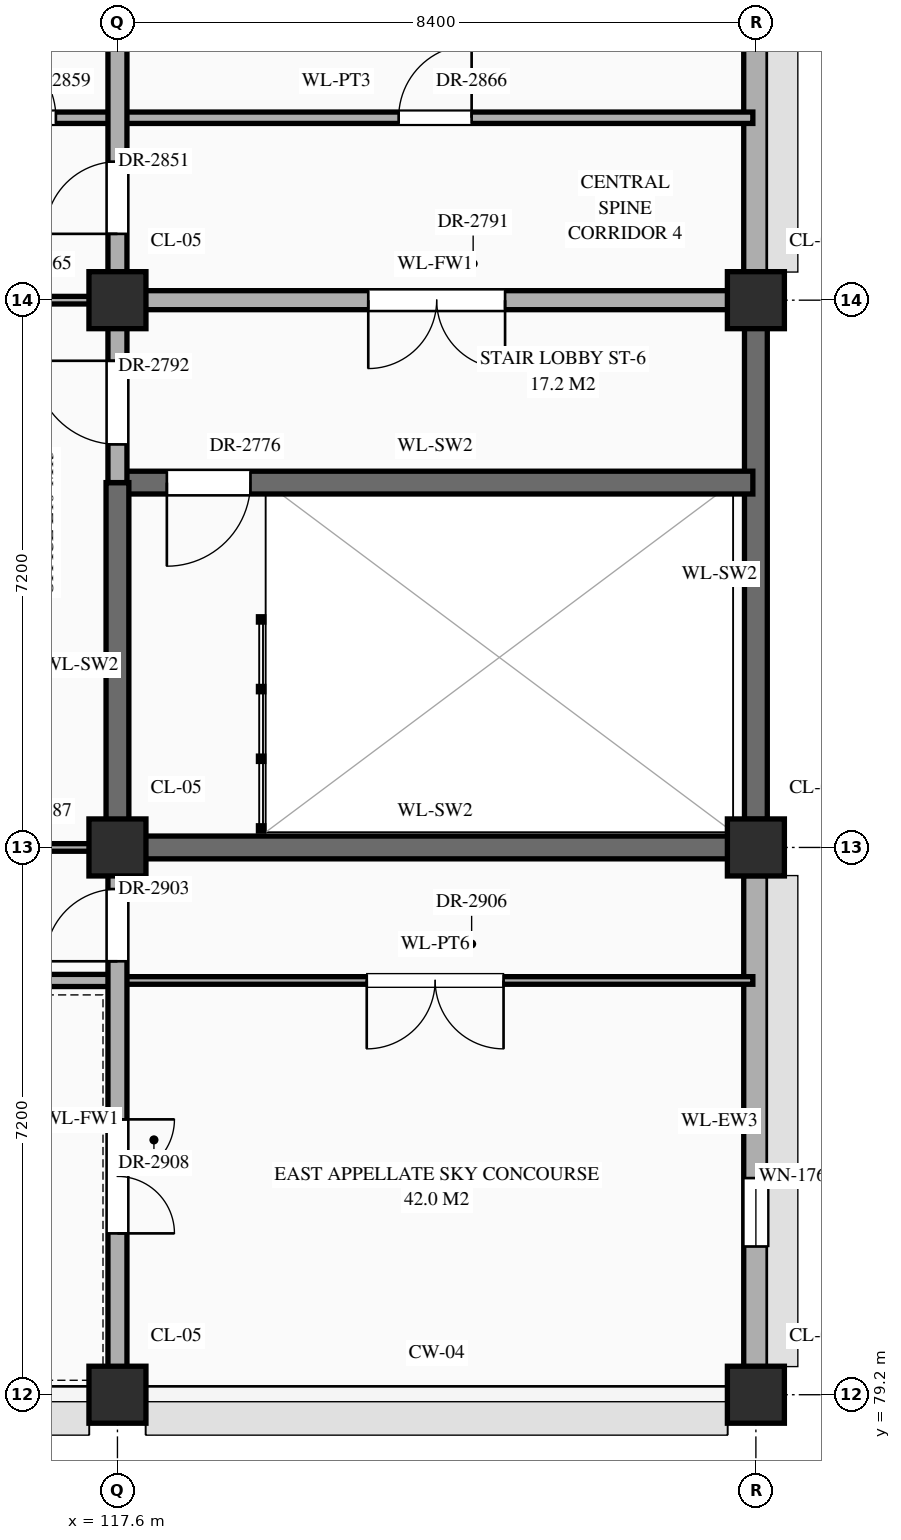
"""IFC4 building model, lengths in metres.
Left out: names, types, materials, properties, quantities, classifications, styles, units other than length and angle.
Written with IfcOpenShell. Run it as: python <this file> out.ifc"""

import sys

from ifc_helpers import new_model, si_unit, direction, frame, frame_2d, origin, origin_2d, place, context, subcontext, project, spatial, rectangle, extrude, element, fill, save


model = new_model("IFC4")
c1 = context("Model", 3, precision=1e-05, world=origin(), true_north=direction((0.0, 1.0)))
c2 = subcontext(c1, "Body", "Model", "MODEL_VIEW")
j1 = project(units=[si_unit("LENGTHUNIT", "METRE"), si_unit("PLANEANGLEUNIT", "RADIAN")], contexts=[c1])
p1 = place(None, origin())
s1 = spatial("IfcSite", under=j1, at=p1, CompositionType="ELEMENT")
p2 = place(p1, origin())
s2 = spatial("IfcBuilding", under=s1, at=p2, CompositionType="ELEMENT")
p3 = place(p2, frame((0.0, 0.0, 43.5)))
s3 = spatial("IfcBuildingStorey", under=s2, at=p3, CompositionType="ELEMENT", Elevation=43.5)
for number, where, z_axis, x_axis in (
    (1, (117.6, 79.2, 0.0), (0.0, 0.0, 1.0), (1.0, 0.0, 0.0)),
    (2, (117.6, 86.4, 0.0), (0.0, 0.0, 1.0), (1.0, 0.0, 0.0)),
    (3, (117.6, 93.6, 0.0), (0.0, 0.0, 1.0), (1.0, 0.0, 0.0)),
    (4, (126.0, 79.2, 0.0), (0.0, 0.0, 1.0), (1.0, 0.0, 0.0)),
    (5, (126.0, 86.4, 0.0), (0.0, 0.0, 1.0), (1.0, 0.0, 0.0)),
    (6, (126.0, 93.6, 0.0), (0.0, 0.0, 1.0), (1.0, 0.0, 0.0)),
):
    element("IfcColumn", number, at=place(p3, frame(where, z_axis=z_axis, x_axis=x_axis)), inside=s3, PredefinedType="COLUMN", context=c2, shape_type="SweptSolid", body=[
        extrude(rectangle(XDim=0.75, YDim=0.75, at=origin_2d()), origin(), (0.0, 0.0, 1.0), 4.2),
    ])
p4 = place(p3, frame((126.0, 79.57, 0.0), z_axis=(0.0, 0.0, 1.0), x_axis=(0.0, 1.0, 0.0)))
e7 = element("IfcWall", 7, at=p4, inside=s3, PredefinedType="STANDARD", context=c2, shape_type="SweptSolid", body=[
    extrude(rectangle(XDim=6.46, YDim=0.32, at=frame_2d((3.23, 0.0))), origin(), (0.0, 0.0, 1.0), 3.35),
])
p5 = place(p4, frame((1.58, 0.0, 0.85)))
e8 = element("IfcOpeningElement", 8, at=p5, cuts=e7, PredefinedType="OPENING", context=c2, shape_type="SweptSolid", body=[
    extrude(rectangle(XDim=0.9, YDim=1.92, at=frame_2d((0.45, 0.96))), frame((0.0, 0.172, 0.0), z_axis=(0.0, -1.0, 0.0), x_axis=(1.0, 0.0, 0.0)), (0.0, 0.0, 1.0), 0.344),
])
p6 = place(p3, frame((126.0, 86.77, 0.0), z_axis=(0.0, 0.0, 1.0), x_axis=(0.0, 1.0, 0.0)))
e9 = element("IfcWall", 9, at=p6, inside=s3, PredefinedType="SHEAR", context=c2, shape_type="SweptSolid", body=[
    extrude(rectangle(XDim=6.46, YDim=0.3, at=frame_2d((3.23, 0.0))), origin(), (0.0, 0.0, 1.0), 4.0),
])
p7 = place(p3, frame((126.0, 93.97, 0.0), z_axis=(0.0, 0.0, 1.0), x_axis=(0.0, 1.0, 0.0)))
e10 = element("IfcWall", 10, at=p7, inside=s3, PredefinedType="STANDARD", context=c2, shape_type="SweptSolid", body=[
    extrude(rectangle(XDim=6.46, YDim=0.32, at=frame_2d((3.23, 0.0))), origin(), (0.0, 0.0, 1.0), 3.35),
])
p8 = place(p7, frame((3.855, 0.0, 0.85)))
e11 = element("IfcOpeningElement", 11, at=p8, cuts=e10, PredefinedType="OPENING", context=c2, shape_type="SweptSolid", body=[
    extrude(rectangle(XDim=1.35, YDim=1.2, at=frame_2d((0.675, 0.6))), frame((0.0, 0.172, 0.0), z_axis=(0.0, -1.0, 0.0), x_axis=(1.0, 0.0, 0.0)), (0.0, 0.0, 1.0), 0.344),
])
p9 = place(p3, frame((100.8, 84.65, 0.0), z_axis=(0.0, 0.0, 1.0), x_axis=(1.0, 0.0, 0.0)))
e12 = element("IfcWall", 12, at=p9, inside=s3, PredefinedType="STANDARD", context=c2, shape_type="SweptSolid", body=[
    extrude(rectangle(XDim=16.8, YDim=0.16, at=frame_2d((8.4, 0.0))), origin(), (0.0, 0.0, 1.0), 3.95),
])
p10 = place(p9, frame((7.45, 0.0, 0.0)))
e13 = element("IfcOpeningElement", 13, at=p10, cuts=e12, PredefinedType="OPENING", context=c2, shape_type="SweptSolid", body=[
    extrude(rectangle(XDim=1.9, YDim=2.5, at=frame_2d((0.95, 1.25))), frame((0.0, 0.092, 0.0), z_axis=(0.0, -1.0, 0.0), x_axis=(1.0, 0.0, 0.0)), (0.0, 0.0, 1.0), 0.184),
])
p11 = place(p3, frame((117.6, 84.65, 0.0), z_axis=(0.0, 0.0, 1.0), x_axis=(1.0, 0.0, 0.0)))
e14 = element("IfcWall", 14, at=p11, inside=s3, PredefinedType="STANDARD", context=c2, shape_type="SweptSolid", body=[
    extrude(rectangle(XDim=8.36, YDim=0.1, at=frame_2d((4.18, 0.0))), origin(), (0.0, 0.0, 1.0), 4.0),
])
p12 = place(p11, frame((3.28, 0.0, 0.0)))
e15 = element("IfcOpeningElement", 15, at=p12, cuts=e14, PredefinedType="OPENING", context=c2, shape_type="SweptSolid", body=[
    extrude(rectangle(XDim=1.8, YDim=2.5, at=frame_2d((0.9, 1.25))), frame((0.0, 0.062, 0.0), z_axis=(0.0, -1.0, 0.0), x_axis=(1.0, 0.0, 0.0)), (0.0, 0.0, 1.0), 0.124),
])
p13 = place(p3, frame((109.2, 86.4, 0.0), z_axis=(0.0, 0.0, 1.0), x_axis=(1.0, 0.0, 0.0)))
e16 = element("IfcWall", 16, at=p13, inside=s3, PredefinedType="STANDARD", context=c2, shape_type="SweptSolid", body=[
    extrude(rectangle(XDim=8.4, YDim=0.1, at=frame_2d((4.2, 0.0))), origin(), (0.0, 0.0, 1.0), 3.1),
])
p14 = place(p13, frame((1.048, 0.0, 0.0)))
e17 = element("IfcOpeningElement", 17, at=p14, cuts=e16, PredefinedType="OPENING", context=c2, shape_type="SweptSolid", body=[
    extrude(rectangle(XDim=1.0, YDim=2.25, at=frame_2d((0.5, 1.125))), frame((0.0, 0.062, 0.0), z_axis=(0.0, -1.0, 0.0), x_axis=(1.0, 0.0, 0.0)), (0.0, 0.0, 1.0), 0.124),
])
p15 = place(p13, frame((3.66, 0.0, 0.0)))
e18 = element("IfcOpeningElement", 18, at=p15, cuts=e16, PredefinedType="OPENING", context=c2, shape_type="SweptSolid", body=[
    extrude(rectangle(XDim=1.08, YDim=2.25, at=frame_2d((0.54, 1.125))), frame((0.0, 0.062, 0.0), z_axis=(0.0, -1.0, 0.0), x_axis=(1.0, 0.0, 0.0)), (0.0, 0.0, 1.0), 0.124),
])
p16 = place(p13, frame((6.292, 0.0, 0.0)))
e19 = element("IfcOpeningElement", 19, at=p16, cuts=e16, PredefinedType="OPENING", context=c2, shape_type="SweptSolid", body=[
    extrude(rectangle(XDim=1.12, YDim=2.25, at=frame_2d((0.56, 1.125))), frame((0.0, 0.062, 0.0), z_axis=(0.0, -1.0, 0.0), x_axis=(1.0, 0.0, 0.0)), (0.0, 0.0, 1.0), 0.124),
])
p17 = place(p3, frame((117.6, 86.4, 0.0), z_axis=(0.0, 0.0, 1.0), x_axis=(1.0, 0.0, 0.0)))
e20 = element("IfcWall", 20, at=p17, inside=s3, PredefinedType="SHEAR", context=c2, shape_type="SweptSolid", body=[
    extrude(rectangle(XDim=8.36, YDim=0.3, at=frame_2d((4.18, 0.0))), origin(), (0.0, 0.0, 1.0), 4.0),
])
p18 = place(p3, frame((117.6, 91.2, 0.0), z_axis=(0.0, 0.0, 1.0), x_axis=(1.0, 0.0, 0.0)))
e21 = element("IfcWall", 21, at=p18, inside=s3, PredefinedType="SHEAR", context=c2, shape_type="SweptSolid", body=[
    extrude(rectangle(XDim=8.36, YDim=0.3, at=frame_2d((4.18, 0.0))), origin(), (0.0, 0.0, 1.0), 4.0),
])
p19 = place(p18, frame((0.65, 0.0, 0.0)))
e22 = element("IfcOpeningElement", 22, at=p19, cuts=e21, PredefinedType="OPENING", context=c2, shape_type="SweptSolid", body=[
    extrude(rectangle(XDim=1.1, YDim=2.2, at=frame_2d((0.55, 1.1))), frame((0.0, 0.162, 0.0), z_axis=(0.0, -1.0, 0.0), x_axis=(1.0, 0.0, 0.0)), (0.0, 0.0, 1.0), 0.324),
])
p20 = place(p3, frame((109.2, 93.6, 0.0), z_axis=(0.0, 0.0, 1.0), x_axis=(1.0, 0.0, 0.0)))
e23 = element("IfcWall", 23, at=p20, inside=s3, PredefinedType="STANDARD", context=c2, shape_type="SweptSolid", body=[
    extrude(rectangle(XDim=8.4, YDim=0.1, at=frame_2d((4.2, 0.0))), origin(), (0.0, 0.0, 1.0), 3.1),
])
p21 = place(p20, frame((1.097, 0.0, 0.0)))
e24 = element("IfcOpeningElement", 24, at=p21, cuts=e23, PredefinedType="OPENING", context=c2, shape_type="SweptSolid", body=[
    extrude(rectangle(XDim=0.9, YDim=2.15, at=frame_2d((0.45, 1.075))), frame((0.0, 0.062, 0.0), z_axis=(0.0, -1.0, 0.0), x_axis=(1.0, 0.0, 0.0)), (0.0, 0.0, 1.0), 0.124),
])
p22 = place(p20, frame((3.77, 0.0, 0.0)))
e25 = element("IfcOpeningElement", 25, at=p22, cuts=e23, PredefinedType="OPENING", context=c2, shape_type="SweptSolid", body=[
    extrude(rectangle(XDim=0.86, YDim=2.1, at=frame_2d((0.43, 1.05))), frame((0.0, 0.062, 0.0), z_axis=(0.0, -1.0, 0.0), x_axis=(1.0, 0.0, 0.0)), (0.0, 0.0, 1.0), 0.124),
])
p23 = place(p20, frame((6.393, 0.0, 0.0)))
e26 = element("IfcOpeningElement", 26, at=p23, cuts=e23, PredefinedType="OPENING", context=c2, shape_type="SweptSolid", body=[
    extrude(rectangle(XDim=0.92, YDim=2.15, at=frame_2d((0.46, 1.075))), frame((0.0, 0.062, 0.0), z_axis=(0.0, -1.0, 0.0), x_axis=(1.0, 0.0, 0.0)), (0.0, 0.0, 1.0), 0.124),
])
p24 = place(p3, frame((117.6, 93.6, 0.0), z_axis=(0.0, 0.0, 1.0), x_axis=(1.0, 0.0, 0.0)))
e27 = element("IfcWall", 27, at=p24, inside=s3, PredefinedType="STANDARD", context=c2, shape_type="SweptSolid", body=[
    extrude(rectangle(XDim=8.36, YDim=0.25, at=frame_2d((4.18, 0.0))), origin(), (0.0, 0.0, 1.0), 3.15),
])
p25 = place(p24, frame((3.3, 0.0, 0.0)))
e28 = element("IfcOpeningElement", 28, at=p25, cuts=e27, PredefinedType="OPENING", context=c2, shape_type="SweptSolid", body=[
    extrude(rectangle(XDim=1.8, YDim=2.35, at=frame_2d((0.9, 1.175))), frame((0.0, 0.137, 0.0), z_axis=(0.0, -1.0, 0.0), x_axis=(1.0, 0.0, 0.0)), (0.0, 0.0, 1.0), 0.274),
])
p26 = place(p3, frame((115.0, 96.0, 0.0), z_axis=(0.0, 0.0, 1.0), x_axis=(1.0, 0.0, 0.0)))
e29 = element("IfcWall", 29, at=p26, inside=s3, PredefinedType="STANDARD", context=c2, shape_type="SweptSolid", body=[
    extrude(rectangle(XDim=10.96, YDim=0.15, at=frame_2d((5.48, 0.0))), origin(), (0.0, 0.0, 1.0), 4.0),
])
p27 = place(p26, frame((0.81, 0.0, 0.0)))
e30 = element("IfcOpeningElement", 30, at=p27, cuts=e29, PredefinedType="OPENING", context=c2, shape_type="SweptSolid", body=[
    extrude(rectangle(XDim=0.98, YDim=2.35, at=frame_2d((0.49, 1.175))), frame((0.0, 0.087, 0.0), z_axis=(0.0, -1.0, 0.0), x_axis=(1.0, 0.0, 0.0)), (0.0, 0.0, 1.0), 0.174),
])
p28 = place(p26, frame((6.3, 0.0, 0.0)))
e31 = element("IfcOpeningElement", 31, at=p28, cuts=e29, PredefinedType="OPENING", context=c2, shape_type="SweptSolid", body=[
    extrude(rectangle(XDim=0.96, YDim=2.2, at=frame_2d((0.48, 1.1))), frame((0.0, 0.087, 0.0), z_axis=(0.0, -1.0, 0.0), x_axis=(1.0, 0.0, 0.0)), (0.0, 0.0, 1.0), 0.174),
])
p29 = place(p3, frame((117.6, 79.24, 0.0), z_axis=(0.0, 0.0, 1.0), x_axis=(0.0, 1.0, 0.0)))
e32 = element("IfcWall", 32, at=p29, inside=s3, PredefinedType="STANDARD", context=c2, shape_type="SweptSolid", body=[
    extrude(rectangle(XDim=7.16, YDim=0.25, at=frame_2d((3.58, 0.0))), origin(), (0.0, 0.0, 1.0), 3.2),
])
p30 = place(p29, frame((5.663, 0.0, 0.0)))
e33 = element("IfcOpeningElement", 33, at=p30, cuts=e32, PredefinedType="OPENING", context=c2, shape_type="SweptSolid", body=[
    extrude(rectangle(XDim=0.95, YDim=2.15, at=frame_2d((0.475, 1.075))), frame((0.0, 0.137, 0.0), z_axis=(0.0, -1.0, 0.0), x_axis=(1.0, 0.0, 0.0)), (0.0, 0.0, 1.0), 0.274),
])
p31 = place(p29, frame((2.083, 0.0, 0.0)))
e34 = element("IfcOpeningElement", 34, at=p31, cuts=e32, PredefinedType="OPENING", context=c2, shape_type="SweptSolid", body=[
    extrude(rectangle(XDim=1.5, YDim=2.25, at=frame_2d((0.75, 1.125))), frame((0.0, 0.137, 0.0), z_axis=(0.0, -1.0, 0.0), x_axis=(1.0, 0.0, 0.0)), (0.0, 0.0, 1.0), 0.274),
])
p32 = place(p3, frame((117.6, 86.4, 0.0), z_axis=(0.0, 0.0, 1.0), x_axis=(0.0, 1.0, 0.0)))
e35 = element("IfcWall", 35, at=p32, inside=s3, PredefinedType="SHEAR", context=c2, shape_type="SweptSolid", body=[
    extrude(rectangle(XDim=4.8, YDim=0.3, at=frame_2d((2.4, 0.0))), origin(), (0.0, 0.0, 1.0), 3.95),
])
p33 = place(p3, frame((117.6, 91.2, 0.0), z_axis=(0.0, 0.0, 1.0), x_axis=(0.0, 1.0, 0.0)))
e36 = element("IfcWall", 36, at=p33, inside=s3, PredefinedType="STANDARD", context=c2, shape_type="SweptSolid", body=[
    extrude(rectangle(XDim=13.2, YDim=0.25, at=frame_2d((6.6, 0.0))), origin(), (0.0, 0.0, 1.0), 3.2),
])
p34 = place(p33, frame((0.502, 0.0, 0.0)))
e37 = element("IfcOpeningElement", 37, at=p34, cuts=e36, PredefinedType="OPENING", context=c2, shape_type="SweptSolid", body=[
    extrude(rectangle(XDim=1.1, YDim=2.2, at=frame_2d((0.55, 1.1))), frame((0.0, 0.137, 0.0), z_axis=(0.0, -1.0, 0.0), x_axis=(1.0, 0.0, 0.0)), (0.0, 0.0, 1.0), 0.274),
])
p35 = place(p33, frame((10.472, 0.0, 0.0)))
e38 = element("IfcOpeningElement", 38, at=p35, cuts=e36, PredefinedType="OPENING", context=c2, shape_type="SweptSolid", body=[
    extrude(rectangle(XDim=0.95, YDim=2.15, at=frame_2d((0.475, 1.075))), frame((0.0, 0.137, 0.0), z_axis=(0.0, -1.0, 0.0), x_axis=(1.0, 0.0, 0.0)), (0.0, 0.0, 1.0), 0.274),
])
p36 = place(p33, frame((3.272, 0.0, 0.0)))
e39 = element("IfcOpeningElement", 39, at=p36, cuts=e36, PredefinedType="OPENING", context=c2, shape_type="SweptSolid", body=[
    extrude(rectangle(XDim=0.95, YDim=2.15, at=frame_2d((0.475, 1.075))), frame((0.0, 0.137, 0.0), z_axis=(0.0, -1.0, 0.0), x_axis=(1.0, 0.0, 0.0)), (0.0, 0.0, 1.0), 0.274),
])
p37 = place(p5, origin())
e40 = element("IfcWindow", 40, at=p37, inside=s3, PartitioningType="SINGLE_PANEL", PredefinedType="WINDOW", context=c2, shape_type="SweptSolid", body=[
    extrude(rectangle(XDim=0.9, YDim=1.92, at=frame_2d((0.45, 0.96))), frame((0.0, 0.03, 0.0), z_axis=(0.0, -1.0, 0.0), x_axis=(1.0, 0.0, 0.0)), (0.0, 0.0, 1.0), 0.06),
])
fill(e8, e40)
p38 = place(p19, frame((1.1, 0.0, 0.0), z_axis=(0.0, 0.0, 1.0), x_axis=(-1.0, 0.0, 0.0)))
e41 = element("IfcDoor", 41, at=p38, inside=s3, OperationType="SINGLE_SWING_RIGHT", PredefinedType="DOOR", context=c2, shape_type="SweptSolid", body=[
    extrude(rectangle(XDim=1.1, YDim=2.2, at=frame_2d((0.55, 1.1))), frame((0.0, 0.025, 0.0), z_axis=(0.0, -1.0, 0.0), x_axis=(1.0, 0.0, 0.0)), (0.0, 0.0, 1.0), 0.05),
])
fill(e22, e41)
p39 = place(p25, frame((1.8, 0.0, 0.0), z_axis=(0.0, 0.0, 1.0), x_axis=(-1.0, 0.0, 0.0)))
e42 = element("IfcDoor", 42, at=p39, inside=s3, OperationType="DOUBLE_DOOR_SINGLE_SWING", PredefinedType="DOOR", context=c2, shape_type="SweptSolid", body=[
    extrude(rectangle(XDim=1.8, YDim=2.35, at=frame_2d((0.9, 1.175))), frame((0.0, 0.025, 0.0), z_axis=(0.0, -1.0, 0.0), x_axis=(1.0, 0.0, 0.0)), (0.0, 0.0, 1.0), 0.05),
])
fill(e28, e42)
p40 = place(p34, origin())
e43 = element("IfcDoor", 43, at=p40, inside=s3, OperationType="SINGLE_SWING_RIGHT", PredefinedType="DOOR", context=c2, shape_type="SweptSolid", body=[
    extrude(rectangle(XDim=1.1, YDim=2.2, at=frame_2d((0.55, 1.1))), frame((0.0, 0.025, 0.0), z_axis=(0.0, -1.0, 0.0), x_axis=(1.0, 0.0, 0.0)), (0.0, 0.0, 1.0), 0.05),
])
fill(e37, e43)
p41 = place(p36, origin())
e44 = element("IfcDoor", 44, at=p41, inside=s3, OperationType="SINGLE_SWING_LEFT", PredefinedType="DOOR", context=c2, shape_type="SweptSolid", body=[
    extrude(rectangle(XDim=0.95, YDim=2.15, at=frame_2d((0.475, 1.075))), frame((0.0, 0.025, 0.0), z_axis=(0.0, -1.0, 0.0), x_axis=(1.0, 0.0, 0.0)), (0.0, 0.0, 1.0), 0.05),
])
fill(e39, e44)
p42 = place(p27, origin())
e45 = element("IfcDoor", 45, at=p42, inside=s3, OperationType="SINGLE_SWING_LEFT", PredefinedType="DOOR", context=c2, shape_type="SweptSolid", body=[
    extrude(rectangle(XDim=0.98, YDim=2.35, at=frame_2d((0.49, 1.175))), frame((0.0, 0.025, 0.0), z_axis=(0.0, -1.0, 0.0), x_axis=(1.0, 0.0, 0.0)), (0.0, 0.0, 1.0), 0.05),
])
fill(e30, e45)
p43 = place(p28, origin())
e46 = element("IfcDoor", 46, at=p43, inside=s3, OperationType="SINGLE_SWING_RIGHT", PredefinedType="DOOR", context=c2, shape_type="SweptSolid", body=[
    extrude(rectangle(XDim=0.96, YDim=2.2, at=frame_2d((0.48, 1.1))), frame((0.0, 0.025, 0.0), z_axis=(0.0, -1.0, 0.0), x_axis=(1.0, 0.0, 0.0)), (0.0, 0.0, 1.0), 0.05),
])
fill(e31, e46)
p44 = place(p30, origin())
e47 = element("IfcDoor", 47, at=p44, inside=s3, OperationType="SINGLE_SWING_LEFT", PredefinedType="DOOR", context=c2, shape_type="SweptSolid", body=[
    extrude(rectangle(XDim=0.95, YDim=2.15, at=frame_2d((0.475, 1.075))), frame((0.0, 0.025, 0.0), z_axis=(0.0, -1.0, 0.0), x_axis=(1.0, 0.0, 0.0)), (0.0, 0.0, 1.0), 0.05),
])
fill(e33, e47)
p45 = place(p12, frame((1.8, 0.0, 0.0), z_axis=(0.0, 0.0, 1.0), x_axis=(-1.0, 0.0, 0.0)))
e48 = element("IfcDoor", 48, at=p45, inside=s3, OperationType="DOUBLE_DOOR_SINGLE_SWING", PredefinedType="DOOR", context=c2, shape_type="SweptSolid", body=[
    extrude(rectangle(XDim=1.8, YDim=2.5, at=frame_2d((0.9, 1.25))), frame((0.0, 0.025, 0.0), z_axis=(0.0, -1.0, 0.0), x_axis=(1.0, 0.0, 0.0)), (0.0, 0.0, 1.0), 0.05),
])
fill(e15, e48)
p46 = place(p31, frame((1.5, 0.0, 0.0), z_axis=(0.0, 0.0, 1.0), x_axis=(-1.0, 0.0, 0.0)))
e49 = element("IfcDoor", 49, at=p46, inside=s3, OperationType="DOUBLE_DOOR_SINGLE_SWING", PredefinedType="DOOR", context=c2, shape_type="SweptSolid", body=[
    extrude(rectangle(XDim=1.5, YDim=2.25, at=frame_2d((0.75, 1.125))), frame((0.0, 0.025, 0.0), z_axis=(0.0, -1.0, 0.0), x_axis=(1.0, 0.0, 0.0)), (0.0, 0.0, 1.0), 0.05),
])
fill(e34, e49)
save(model, sys.argv[1])
